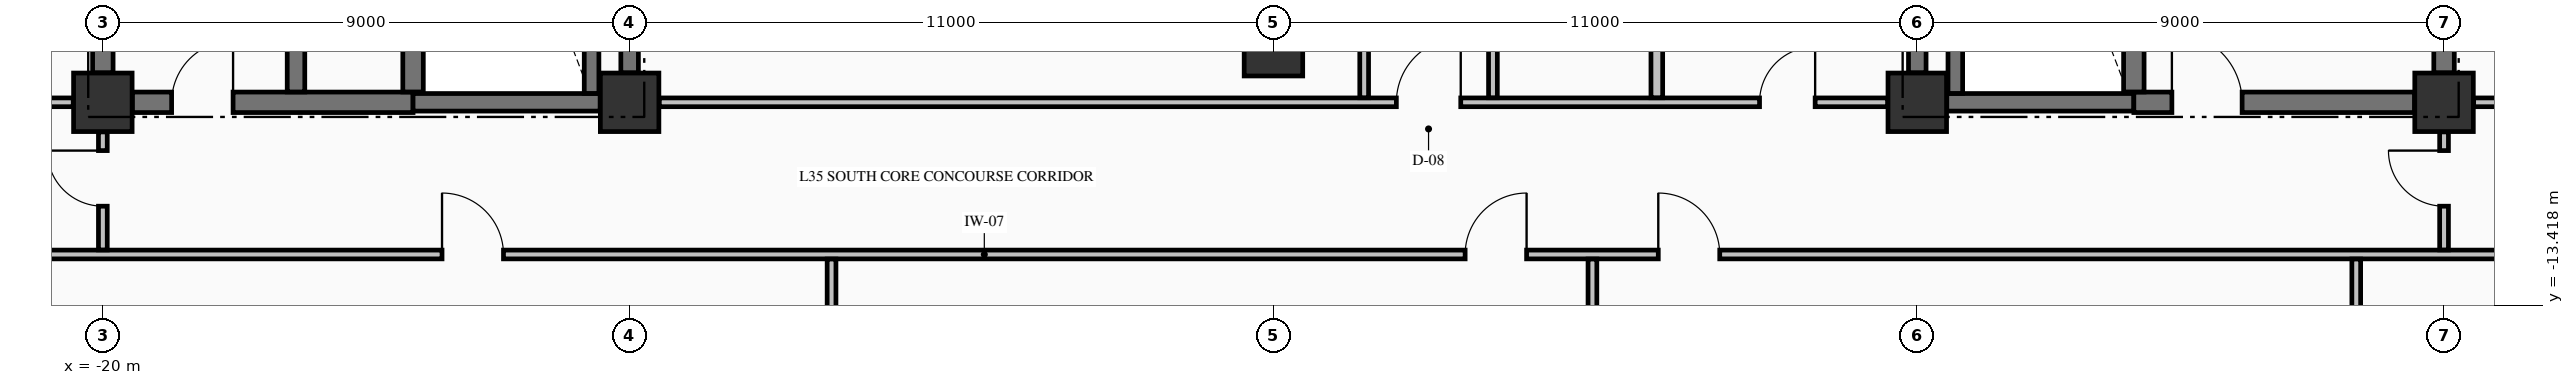
"""IFC4 building model, lengths in metres.
Left out: names, types, materials, properties, quantities, classifications, styles, units other than length and angle.
Written with IfcOpenShell. Run it as: python <this file> out.ifc"""

import sys

from ifc_helpers import new_model, si_unit, direction, frame, frame_2d, origin, origin_2d, place, context, subcontext, project, spatial, rectangle, extrude, element, fill, save


model = new_model("IFC4")
c1 = context("Model", 3, precision=1e-05, world=origin(), true_north=direction((0.0, 1.0)))
c2 = subcontext(c1, "Body", "Model", "MODEL_VIEW")
j1 = project(units=[si_unit("LENGTHUNIT", "METRE"), si_unit("PLANEANGLEUNIT", "RADIAN")], contexts=[c1])
p1 = place(None, origin())
s1 = spatial("IfcSite", under=j1, at=p1, CompositionType="ELEMENT")
p2 = place(p1, origin())
s2 = spatial("IfcBuilding", under=s1, at=p2, CompositionType="ELEMENT")
p3 = place(p2, frame((0.0, 0.0, 139.2)))
s3 = spatial("IfcBuildingStorey", under=s2, at=p3, CompositionType="ELEMENT", Elevation=139.2)
for number, where, z_axis, x_axis in (
    (1, (-20.0, -9.95, -0.25), (0.0, 0.0, 1.0), (1.0, 0.0, 0.0)),
    (2, (-11.0, -9.95, -0.25), (0.0, 0.0, 1.0), (1.0, 0.0, 0.0)),
    (3, (11.0, -9.95, -0.25), (0.0, 0.0, 1.0), (1.0, 0.0, 0.0)),
    (4, (20.0, -9.95, -0.25), (0.0, 0.0, 1.0), (1.0, 0.0, 0.0)),
    (5, (0.0, -9.0, -0.25), (0.0, 0.0, 1.0), (1.0, 0.0, 0.0)),
):
    element("IfcColumn", number, at=place(p3, frame(where, z_axis=z_axis, x_axis=x_axis)), inside=s3, PredefinedType="COLUMN", context=c2, shape_type="SweptSolid", body=[
        extrude(rectangle(XDim=1.0, YDim=1.0, at=origin_2d()), origin(), (0.0, 0.0, 1.0), 3.495),
    ])
p4 = place(p3, frame((-19.496, -9.95, 0.0), z_axis=(0.0, 0.0, 1.0), x_axis=(1.0, 0.0, 0.0)))
e6 = element("IfcWall", 6, at=p4, inside=s3, PredefinedType="SHEAR", context=c2, shape_type="SweptSolid", body=[
    extrude(rectangle(XDim=4.796, YDim=0.35, at=frame_2d((2.398, 0.0))), origin(), (0.0, 0.0, 1.0), 3.245),
])
p5 = place(p4, frame((0.671, 0.0, 0.0)))
e7 = element("IfcOpeningElement", 7, at=p5, cuts=e6, PredefinedType="OPENING", context=c2, shape_type="SweptSolid", body=[
    extrude(rectangle(XDim=1.05, YDim=2.15, at=frame_2d((0.525, 1.075))), frame((0.0, 0.185, 0.0), z_axis=(0.0, -1.0, 0.0), x_axis=(1.0, 0.0, 0.0)), (0.0, 0.0, 1.0), 0.37),
])
for number, where, z_axis, x_axis in (
    (8, (-14.7, -9.95, 0.0), (0.0, 0.0, 1.0), (1.0, 0.0, 0.0)),
    (9, (11.504, -9.95, 0.0), (0.0, 0.0, 1.0), (1.0, 0.0, 0.0)),
):
    element("IfcWall", number, at=place(p3, frame(where, z_axis=z_axis, x_axis=x_axis)), inside=s3, PredefinedType="SHEAR", context=c2, shape_type="SweptSolid", body=[
        extrude(rectangle(XDim=3.196, YDim=0.3, at=frame_2d((1.598, 0.0))), origin(), (0.0, 0.0, 1.0), 3.245),
    ])
p6 = place(p3, frame((14.7, -9.95, 0.0), z_axis=(0.0, 0.0, 1.0), x_axis=(1.0, 0.0, 0.0)))
e10 = element("IfcWall", 10, at=p6, inside=s3, PredefinedType="SHEAR", context=c2, shape_type="SweptSolid", body=[
    extrude(rectangle(XDim=4.796, YDim=0.35, at=frame_2d((2.398, 0.0))), origin(), (0.0, 0.0, 1.0), 3.245),
])
p7 = place(p6, frame((0.65, 0.0, 0.0)))
e11 = element("IfcOpeningElement", 11, at=p7, cuts=e10, PredefinedType="OPENING", context=c2, shape_type="SweptSolid", body=[
    extrude(rectangle(XDim=1.2, YDim=2.15, at=frame_2d((0.6, 1.075))), frame((0.0, 0.185, 0.0), z_axis=(0.0, -1.0, 0.0), x_axis=(1.0, 0.0, 0.0)), (0.0, 0.0, 1.0), 0.37),
])
p8 = place(p3, frame((-27.835, -12.55, 0.0), z_axis=(0.0, 0.0, 1.0), x_axis=(1.0, 0.0, 0.0)))
e12 = element("IfcWall", 12, at=p8, inside=s3, PredefinedType="PARTITIONING", context=c2, shape_type="SweptSolid", body=[
    extrude(rectangle(XDim=50.67, YDim=0.15, at=frame_2d((25.335, 0.0))), origin(), (0.0, 0.0, 1.0), 3.245),
])
p9 = place(p8, frame((13.63, 0.0, 0.0)))
e13 = element("IfcOpeningElement", 13, at=p9, cuts=e12, PredefinedType="OPENING", context=c2, shape_type="SweptSolid", body=[
    extrude(rectangle(XDim=1.05, YDim=2.15, at=frame_2d((0.525, 1.075))), frame((0.0, 0.085, 0.0), z_axis=(0.0, -1.0, 0.0), x_axis=(1.0, 0.0, 0.0)), (0.0, 0.0, 1.0), 0.17),
])
p10 = place(p8, frame((31.11, 0.0, 0.0)))
e14 = element("IfcOpeningElement", 14, at=p10, cuts=e12, PredefinedType="OPENING", context=c2, shape_type="SweptSolid", body=[
    extrude(rectangle(XDim=1.05, YDim=2.15, at=frame_2d((0.525, 1.075))), frame((0.0, 0.085, 0.0), z_axis=(0.0, -1.0, 0.0), x_axis=(1.0, 0.0, 0.0)), (0.0, 0.0, 1.0), 0.17),
])
p11 = place(p8, frame((34.41, 0.0, 0.0)))
e15 = element("IfcOpeningElement", 15, at=p11, cuts=e12, PredefinedType="OPENING", context=c2, shape_type="SweptSolid", body=[
    extrude(rectangle(XDim=1.05, YDim=2.15, at=frame_2d((0.525, 1.075))), frame((0.0, 0.085, 0.0), z_axis=(0.0, -1.0, 0.0), x_axis=(1.0, 0.0, 0.0)), (0.0, 0.0, 1.0), 0.17),
])
p12 = place(p3, frame((-27.835, -9.95, 0.0), z_axis=(0.0, 0.0, 1.0), x_axis=(1.0, 0.0, 0.0)))
e16 = element("IfcWall", 16, at=p12, inside=s3, PredefinedType="PARTITIONING", context=c2, shape_type="SweptSolid", body=[
    extrude(rectangle(XDim=7.329, YDim=0.15, at=frame_2d((3.665, 0.0))), origin(), (0.0, 0.0, 1.0), 3.245),
])
p13 = place(p12, frame((3.335, 0.0, 0.0)))
e17 = element("IfcOpeningElement", 17, at=p13, cuts=e16, PredefinedType="OPENING", context=c2, shape_type="SweptSolid", body=[
    extrude(rectangle(XDim=1.0, YDim=2.15, at=frame_2d((0.5, 1.075))), frame((0.0, 0.085, 0.0), z_axis=(0.0, -1.0, 0.0), x_axis=(1.0, 0.0, 0.0)), (0.0, 0.0, 1.0), 0.17),
])
p14 = place(p3, frame((-10.494, -9.95, 0.0), z_axis=(0.0, 0.0, 1.0), x_axis=(1.0, 0.0, 0.0)))
e18 = element("IfcWall", 18, at=p14, inside=s3, PredefinedType="PARTITIONING", context=c2, shape_type="SweptSolid", body=[
    extrude(rectangle(XDim=20.988, YDim=0.15, at=frame_2d((10.494, 0.0))), origin(), (0.0, 0.0, 1.0), 3.245),
])
p15 = place(p14, frame((12.594, 0.0, 0.0)))
e19 = element("IfcOpeningElement", 19, at=p15, cuts=e18, PredefinedType="OPENING", context=c2, shape_type="SweptSolid", body=[
    extrude(rectangle(XDim=1.1, YDim=2.15, at=frame_2d((0.55, 1.075))), frame((0.0, 0.085, 0.0), z_axis=(0.0, -1.0, 0.0), x_axis=(1.0, 0.0, 0.0)), (0.0, 0.0, 1.0), 0.17),
])
p16 = place(p14, frame((18.799, 0.0, 0.0)))
e20 = element("IfcOpeningElement", 20, at=p16, cuts=e18, PredefinedType="OPENING", context=c2, shape_type="SweptSolid", body=[
    extrude(rectangle(XDim=0.95, YDim=2.15, at=frame_2d((0.475, 1.075))), frame((0.0, 0.085, 0.0), z_axis=(0.0, -1.0, 0.0), x_axis=(1.0, 0.0, 0.0)), (0.0, 0.0, 1.0), 0.17),
])
p17 = place(p3, frame((20.506, -9.95, 0.0), z_axis=(0.0, 0.0, 1.0), x_axis=(1.0, 0.0, 0.0)))
e21 = element("IfcWall", 21, at=p17, inside=s3, PredefinedType="PARTITIONING", context=c2, shape_type="SweptSolid", body=[
    extrude(rectangle(XDim=2.329, YDim=0.15, at=frame_2d((1.165, 0.0))), origin(), (0.0, 0.0, 1.0), 3.245),
])
p18 = place(p17, frame((0.519, 0.0, 0.0)))
e22 = element("IfcOpeningElement", 22, at=p18, cuts=e21, PredefinedType="OPENING", context=c2, shape_type="SweptSolid", body=[
    extrude(rectangle(XDim=0.95, YDim=2.15, at=frame_2d((0.475, 1.075))), frame((0.0, 0.085, 0.0), z_axis=(0.0, -1.0, 0.0), x_axis=(1.0, 0.0, 0.0)), (0.0, 0.0, 1.0), 0.17),
])
p19 = place(p3, frame((-20.0, -9.446, 0.0), z_axis=(0.0, 0.0, 1.0), x_axis=(0.0, 1.0, 0.0)))
e23 = element("IfcWall", 23, at=p19, inside=s3, PredefinedType="SHEAR", context=c2, shape_type="SweptSolid", body=[
    extrude(rectangle(XDim=8.942, YDim=0.35, at=frame_2d((4.471, 0.0))), origin(), (0.0, 0.0, 1.0), 3.245),
])
p20 = place(p3, frame((-16.7, -9.773, 0.0), z_axis=(0.0, 0.0, 1.0), x_axis=(0.0, 1.0, 0.0)))
e24 = element("IfcWall", 24, at=p20, inside=s3, PredefinedType="SHEAR", context=c2, shape_type="SweptSolid", body=[
    extrude(rectangle(XDim=9.371, YDim=0.3, at=frame_2d((4.686, 0.0))), origin(), (0.0, 0.0, 1.0), 3.245),
])
p21 = place(p3, frame((-14.7, -9.773, 0.0), z_axis=(0.0, 0.0, 1.0), x_axis=(0.0, 1.0, 0.0)))
e25 = element("IfcWall", 25, at=p21, inside=s3, PredefinedType="SHEAR", context=c2, shape_type="SweptSolid", body=[
    extrude(rectangle(XDim=9.371, YDim=0.35, at=frame_2d((4.686, 0.0))), origin(), (0.0, 0.0, 1.0), 3.245),
])
p22 = place(p3, frame((-11.65, -9.798, 0.0), z_axis=(0.0, 0.0, 1.0), x_axis=(0.0, 1.0, 0.0)))
e26 = element("IfcWall", 26, at=p22, inside=s3, PredefinedType="SOLIDWALL", context=c2, shape_type="SweptSolid", body=[
    extrude(rectangle(XDim=9.396, YDim=0.25, at=frame_2d((4.698, 0.0))), origin(), (0.0, 0.0, 1.0), 3.245),
])
for number, where, z_axis, x_axis in (
    (27, (-11.0, -9.446, 0.0), (0.0, 0.0, 1.0), (0.0, 1.0, 0.0)),
    (28, (11.0, -9.446, 0.0), (0.0, 0.0, 1.0), (0.0, 1.0, 0.0)),
):
    element("IfcWall", number, at=place(p3, frame(where, z_axis=z_axis, x_axis=x_axis)), inside=s3, PredefinedType="SHEAR", context=c2, shape_type="SweptSolid", body=[
        extrude(rectangle(XDim=8.942, YDim=0.3, at=frame_2d((4.471, 0.0))), origin(), (0.0, 0.0, 1.0), 3.245),
    ])
p23 = place(p3, frame((11.65, -9.798, 0.0), z_axis=(0.0, 0.0, 1.0), x_axis=(0.0, 1.0, 0.0)))
e29 = element("IfcWall", 29, at=p23, inside=s3, PredefinedType="SOLIDWALL", context=c2, shape_type="SweptSolid", body=[
    extrude(rectangle(XDim=9.396, YDim=0.25, at=frame_2d((4.698, 0.0))), origin(), (0.0, 0.0, 1.0), 3.245),
])
p24 = place(p3, frame((14.7, -9.773, 0.0), z_axis=(0.0, 0.0, 1.0), x_axis=(0.0, 1.0, 0.0)))
e30 = element("IfcWall", 30, at=p24, inside=s3, PredefinedType="SHEAR", context=c2, shape_type="SweptSolid", body=[
    extrude(rectangle(XDim=9.371, YDim=0.35, at=frame_2d((4.686, 0.0))), origin(), (0.0, 0.0, 1.0), 3.245),
])
p25 = place(p3, frame((20.0, -9.446, 0.0), z_axis=(0.0, 0.0, 1.0), x_axis=(0.0, 1.0, 0.0)))
e31 = element("IfcWall", 31, at=p25, inside=s3, PredefinedType="SHEAR", context=c2, shape_type="SweptSolid", body=[
    extrude(rectangle(XDim=2.269, YDim=0.35, at=frame_2d((1.135, 0.0))), origin(), (0.0, 0.0, 1.0), 3.245),
])
p26 = place(p3, frame((-20.0, -12.472, 0.0), z_axis=(0.0, 0.0, 1.0), x_axis=(0.0, 1.0, 0.0)))
e32 = element("IfcWall", 32, at=p26, inside=s3, PredefinedType="PARTITIONING", context=c2, shape_type="SweptSolid", body=[
    extrude(rectangle(XDim=2.016, YDim=0.15, at=frame_2d((1.008, 0.0))), origin(), (0.0, 0.0, 1.0), 2.735),
])
p27 = place(p26, frame((0.747, 0.0, 0.0)))
e33 = element("IfcOpeningElement", 33, at=p27, cuts=e32, PredefinedType="OPENING", context=c2, shape_type="SweptSolid", body=[
    extrude(rectangle(XDim=0.95, YDim=2.15, at=frame_2d((0.475, 1.075))), frame((0.0, 0.085, 0.0), z_axis=(0.0, -1.0, 0.0), x_axis=(1.0, 0.0, 0.0)), (0.0, 0.0, 1.0), 0.17),
])
p28 = place(p3, frame((-7.55, -25.335, 0.0), z_axis=(0.0, 0.0, 1.0), x_axis=(0.0, 1.0, 0.0)))
e34 = element("IfcWall", 34, at=p28, inside=s3, PredefinedType="PARTITIONING", context=c2, shape_type="SweptSolid", body=[
    extrude(rectangle(XDim=12.707, YDim=0.15, at=frame_2d((6.354, 0.0))), origin(), (0.0, 0.0, 1.0), 3.245),
])
p29 = place(p3, frame((1.55, -9.872, 0.0), z_axis=(0.0, 0.0, 1.0), x_axis=(0.0, 1.0, 0.0)))
e35 = element("IfcWall", 35, at=p29, inside=s3, PredefinedType="PARTITIONING", context=c2, shape_type="SweptSolid", body=[
    extrude(rectangle(XDim=9.544, YDim=0.15, at=frame_2d((4.772, 0.0))), origin(), (0.0, 0.0, 1.0), 3.245),
])
p30 = place(p3, frame((3.75, -9.872, 0.0), z_axis=(0.0, 0.0, 1.0), x_axis=(0.0, 1.0, 0.0)))
e36 = element("IfcWall", 36, at=p30, inside=s3, PredefinedType="PARTITIONING", context=c2, shape_type="SweptSolid", body=[
    extrude(rectangle(XDim=5.519, YDim=0.15, at=frame_2d((2.76, 0.0))), origin(), (0.0, 0.0, 1.0), 3.245),
])
p31 = place(p30, frame((1.997, 0.0, 0.0)))
e37 = element("IfcOpeningElement", 37, at=p31, cuts=e36, PredefinedType="OPENING", context=c2, shape_type="SweptSolid", body=[
    extrude(rectangle(XDim=0.95, YDim=2.15, at=frame_2d((0.475, 1.075))), frame((0.0, 0.085, 0.0), z_axis=(0.0, -1.0, 0.0), x_axis=(1.0, 0.0, 0.0)), (0.0, 0.0, 1.0), 0.17),
])
p32 = place(p3, frame((5.45, -25.335, 0.0), z_axis=(0.0, 0.0, 1.0), x_axis=(0.0, 1.0, 0.0)))
e38 = element("IfcWall", 38, at=p32, inside=s3, PredefinedType="PARTITIONING", context=c2, shape_type="SweptSolid", body=[
    extrude(rectangle(XDim=12.707, YDim=0.15, at=frame_2d((6.354, 0.0))), origin(), (0.0, 0.0, 1.0), 3.245),
])
p33 = place(p3, frame((6.55, -9.872, 0.0), z_axis=(0.0, 0.0, 1.0), x_axis=(0.0, 1.0, 0.0)))
e39 = element("IfcWall", 39, at=p33, inside=s3, PredefinedType="PARTITIONING", context=c2, shape_type="SweptSolid", body=[
    extrude(rectangle(XDim=5.519, YDim=0.2, at=frame_2d((2.76, 0.0))), origin(), (0.0, 0.0, 1.0), 3.245),
])
p34 = place(p3, frame((18.5, -20.394, 0.0), z_axis=(0.0, 0.0, 1.0), x_axis=(0.0, 1.0, 0.0)))
e40 = element("IfcWall", 40, at=p34, inside=s3, PredefinedType="PARTITIONING", context=c2, shape_type="SweptSolid", body=[
    extrude(rectangle(XDim=7.766, YDim=0.15, at=frame_2d((3.883, 0.0))), origin(), (0.0, 0.0, 1.0), 3.245),
])
p35 = place(p3, frame((20.0, -12.472, 0.0), z_axis=(0.0, 0.0, 1.0), x_axis=(0.0, 1.0, 0.0)))
e41 = element("IfcWall", 41, at=p35, inside=s3, PredefinedType="PARTITIONING", context=c2, shape_type="SweptSolid", body=[
    extrude(rectangle(XDim=2.016, YDim=0.15, at=frame_2d((1.008, 0.0))), origin(), (0.0, 0.0, 1.0), 2.735),
])
p36 = place(p35, frame((0.747, 0.0, 0.0)))
e42 = element("IfcOpeningElement", 42, at=p36, cuts=e41, PredefinedType="OPENING", context=c2, shape_type="SweptSolid", body=[
    extrude(rectangle(XDim=0.95, YDim=2.15, at=frame_2d((0.475, 1.075))), frame((0.0, 0.085, 0.0), z_axis=(0.0, -1.0, 0.0), x_axis=(1.0, 0.0, 0.0)), (0.0, 0.0, 1.0), 0.17),
])
p37 = place(p5, origin())
e43 = element("IfcDoor", 43, at=p37, inside=s3, OperationType="SINGLE_SWING_RIGHT", PredefinedType="DOOR", context=c2, shape_type="SweptSolid", body=[
    extrude(rectangle(XDim=1.05, YDim=2.15, at=frame_2d((0.525, 1.075))), frame((0.0, 0.025, 0.0), z_axis=(0.0, -1.0, 0.0), x_axis=(1.0, 0.0, 0.0)), (0.0, 0.0, 1.0), 0.05),
])
fill(e7, e43)
p38 = place(p7, origin())
e44 = element("IfcDoor", 44, at=p38, inside=s3, OperationType="SINGLE_SWING_LEFT", PredefinedType="DOOR", context=c2, shape_type="SweptSolid", body=[
    extrude(rectangle(XDim=1.2, YDim=2.15, at=frame_2d((0.6, 1.075))), frame((0.0, 0.025, 0.0), z_axis=(0.0, -1.0, 0.0), x_axis=(1.0, 0.0, 0.0)), (0.0, 0.0, 1.0), 0.05),
])
fill(e11, e44)
p39 = place(p15, origin())
e45 = element("IfcDoor", 45, at=p39, inside=s3, OperationType="SINGLE_SWING_RIGHT", PredefinedType="DOOR", context=c2, shape_type="SweptSolid", body=[
    extrude(rectangle(XDim=1.1, YDim=2.15, at=frame_2d((0.55, 1.075))), frame((0.0, 0.025, 0.0), z_axis=(0.0, -1.0, 0.0), x_axis=(1.0, 0.0, 0.0)), (0.0, 0.0, 1.0), 0.05),
])
fill(e19, e45)
p40 = place(p9, origin())
e46 = element("IfcDoor", 46, at=p40, inside=s3, OperationType="SINGLE_SWING_LEFT", PredefinedType="DOOR", context=c2, shape_type="SweptSolid", body=[
    extrude(rectangle(XDim=1.05, YDim=2.15, at=frame_2d((0.525, 1.075))), frame((0.0, 0.025, 0.0), z_axis=(0.0, -1.0, 0.0), x_axis=(1.0, 0.0, 0.0)), (0.0, 0.0, 1.0), 0.05),
])
fill(e13, e46)
p41 = place(p10, origin())
e47 = element("IfcDoor", 47, at=p41, inside=s3, OperationType="SINGLE_SWING_RIGHT", PredefinedType="DOOR", context=c2, shape_type="SweptSolid", body=[
    extrude(rectangle(XDim=1.05, YDim=2.15, at=frame_2d((0.525, 1.075))), frame((0.0, 0.025, 0.0), z_axis=(0.0, -1.0, 0.0), x_axis=(1.0, 0.0, 0.0)), (0.0, 0.0, 1.0), 0.05),
])
fill(e14, e47)
p42 = place(p11, origin())
e48 = element("IfcDoor", 48, at=p42, inside=s3, OperationType="SINGLE_SWING_LEFT", PredefinedType="DOOR", context=c2, shape_type="SweptSolid", body=[
    extrude(rectangle(XDim=1.05, YDim=2.15, at=frame_2d((0.525, 1.075))), frame((0.0, 0.025, 0.0), z_axis=(0.0, -1.0, 0.0), x_axis=(1.0, 0.0, 0.0)), (0.0, 0.0, 1.0), 0.05),
])
fill(e15, e48)
p43 = place(p16, origin())
e49 = element("IfcDoor", 49, at=p43, inside=s3, OperationType="SINGLE_SWING_RIGHT", PredefinedType="DOOR", context=c2, shape_type="SweptSolid", body=[
    extrude(rectangle(XDim=0.95, YDim=2.15, at=frame_2d((0.475, 1.075))), frame((0.0, 0.025, 0.0), z_axis=(0.0, -1.0, 0.0), x_axis=(1.0, 0.0, 0.0)), (0.0, 0.0, 1.0), 0.05),
])
fill(e20, e49)
p44 = place(p27, origin())
e50 = element("IfcDoor", 50, at=p44, inside=s3, OperationType="SINGLE_SWING_RIGHT", PredefinedType="DOOR", context=c2, shape_type="SweptSolid", body=[
    extrude(rectangle(XDim=0.95, YDim=2.15, at=frame_2d((0.475, 1.075))), frame((0.0, 0.025, 0.0), z_axis=(0.0, -1.0, 0.0), x_axis=(1.0, 0.0, 0.0)), (0.0, 0.0, 1.0), 0.05),
])
fill(e33, e50)
p45 = place(p36, origin())
e51 = element("IfcDoor", 51, at=p45, inside=s3, OperationType="SINGLE_SWING_RIGHT", PredefinedType="DOOR", context=c2, shape_type="SweptSolid", body=[
    extrude(rectangle(XDim=0.95, YDim=2.15, at=frame_2d((0.475, 1.075))), frame((0.0, 0.025, 0.0), z_axis=(0.0, -1.0, 0.0), x_axis=(1.0, 0.0, 0.0)), (0.0, 0.0, 1.0), 0.05),
])
fill(e42, e51)
save(model, sys.argv[1])
